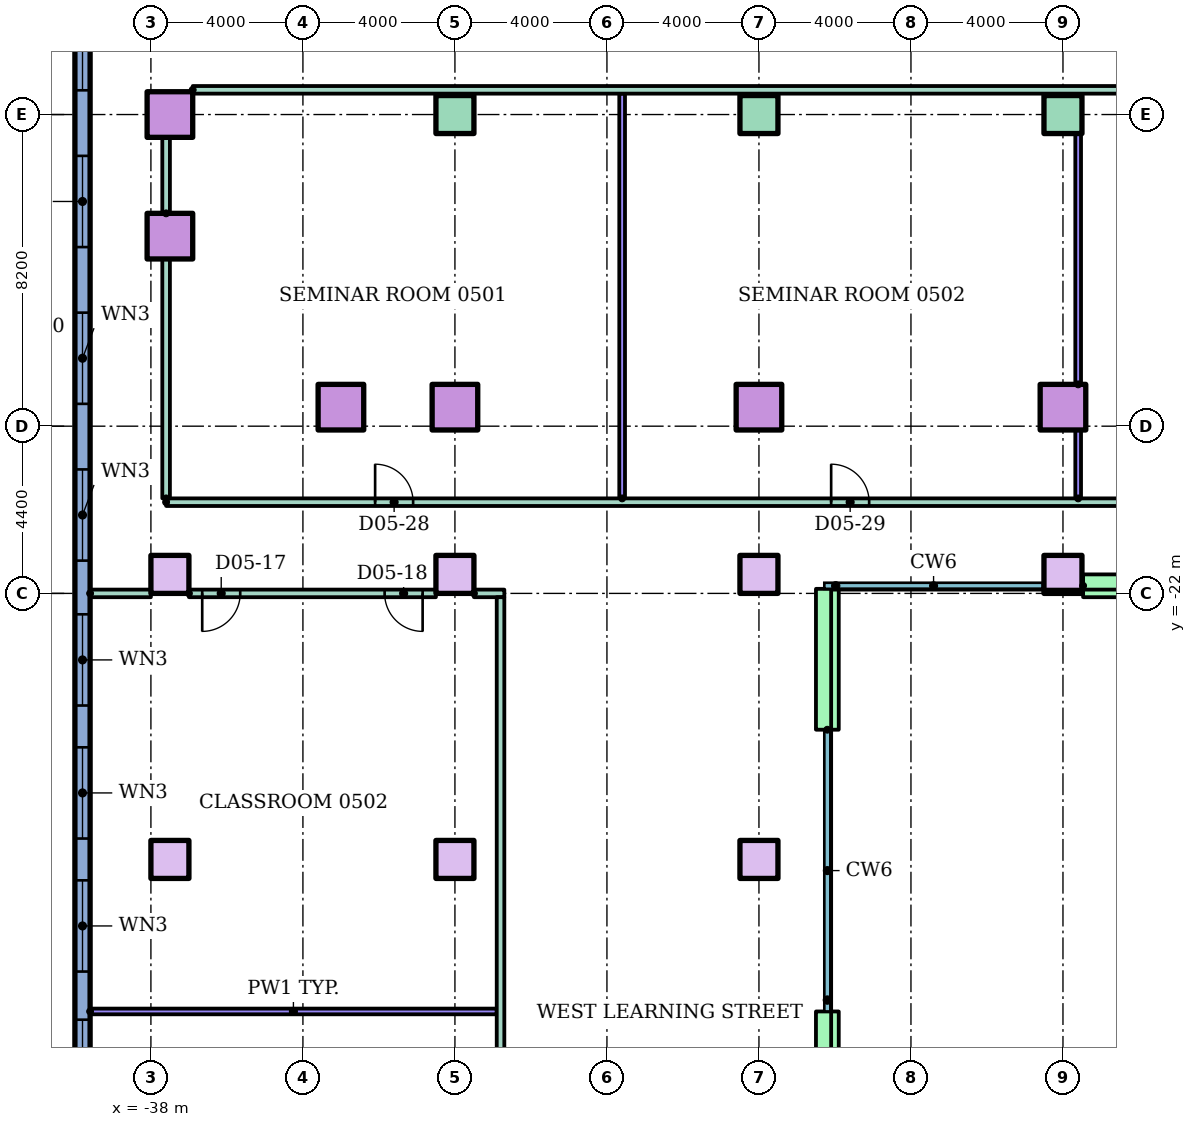
"""IFC4 building model, lengths in metres.
Left out: names, types, materials, properties, quantities, classifications, styles, units other than length and angle.
Written with IfcOpenShell. Run it as: python <this file> out.ifc"""

import sys

from ifc_helpers import new_model, si_unit, direction, frame, frame_2d, origin, origin_2d, place, context, subcontext, project, spatial, rectangle, hollow_rectangle, extrude, element, fill, save


model = new_model("IFC4")
c1 = context("Model", 3, precision=1e-05, world=origin(), true_north=direction((0.0, 1.0)))
c2 = subcontext(c1, "Body", "Model", "MODEL_VIEW")
j1 = project(units=[si_unit("LENGTHUNIT", "METRE"), si_unit("PLANEANGLEUNIT", "RADIAN")], contexts=[c1])
p1 = place(None, origin())
s1 = spatial("IfcSite", under=j1, at=p1, CompositionType="ELEMENT")
p2 = place(p1, origin())
s2 = spatial("IfcBuilding", under=s1, at=p2, CompositionType="ELEMENT")
p3 = place(p2, frame((0.0, 0.0, 22.0)))
s3 = spatial("IfcBuildingStorey", under=s2, at=p3, CompositionType="ELEMENT", Elevation=22.0)
for number, where in (
    (1, (-33.0, -17.1, 0.0)),
    (2, (-30.0, -17.1, 0.0)),
    (3, (-22.0, -17.1, 0.0)),
    (4, (-14.0, -17.1, 0.0)),
    (5, (-37.5, -12.6, 0.0)),
    (6, (-37.5, -9.4, 0.0)),
):
    element("IfcColumn", number, at=place(p3, frame(where)), inside=s3, PredefinedType="COLUMN", context=c2, shape_type="SweptSolid", body=[
        extrude(hollow_rectangle(XDim=1.2, YDim=1.2, WallThickness=0.06, at=origin_2d()), origin(), (0.0, 0.0, 1.0), 4.0),
    ])
for number, where in (
    (7, (-30.0, -9.4, 0.0)),
    (8, (-22.0, -9.4, 0.0)),
    (9, (-14.0, -9.4, 0.0)),
):
    element("IfcColumn", number, at=place(p3, frame(where)), inside=s3, PredefinedType="COLUMN", context=c2, shape_type="SweptSolid", body=[
        extrude(rectangle(XDim=1.0, YDim=1.0, at=origin_2d()), origin(), (0.0, 0.0, 1.0), 4.0),
    ])
for number, where in (
    (10, (-37.5, -29.0, 0.0)),
    (11, (-30.0, -29.0, 0.0)),
    (12, (-22.0, -29.0, 0.0)),
    (13, (-37.5, -21.5, 0.0)),
    (14, (-30.0, -21.5, 0.0)),
    (15, (-22.0, -21.5, 0.0)),
    (16, (-14.0, -21.5, 0.0)),
):
    element("IfcColumn", number, at=place(p3, frame(where)), inside=s3, PredefinedType="COLUMN", context=c2, shape_type="SweptSolid", body=[
        extrude(rectangle(XDim=1.0, YDim=1.0, at=origin_2d()), origin(), (0.0, 0.0, 1.0), 3.7),
    ])
p4 = place(p3, frame((-39.8, 20.0, 0.0), z_axis=(0.0, 0.0, 1.0), x_axis=(0.0, -1.0, 0.0)))
e17 = element("IfcWall", 17, at=p4, inside=s3, PredefinedType="STANDARD", context=c2, shape_type="SweptSolid", body=[
    extrude(rectangle(XDim=70.0, YDim=0.4, at=frame_2d((35.0, 0.0))), origin(), (0.0, 0.0, 1.0), 3.7),
])
p5 = place(p4, frame((1.05, 0.0, 0.9)))
e18 = element("IfcOpeningElement", 18, at=p5, cuts=e17, PredefinedType="OPENING", context=c2, shape_type="SweptSolid", body=[
    extrude(rectangle(XDim=2.4, YDim=2.1, at=frame_2d((1.2, 1.05))), frame((0.0, 0.21, 0.0), z_axis=(0.0, -1.0, 0.0), x_axis=(1.0, 0.0, 0.0)), (0.0, 0.0, 1.0), 0.42),
])
p6 = place(p4, frame((5.55, 0.0, 0.9)))
e19 = element("IfcOpeningElement", 19, at=p6, cuts=e17, PredefinedType="OPENING", context=c2, shape_type="SweptSolid", body=[
    extrude(rectangle(XDim=2.4, YDim=2.1, at=frame_2d((1.2, 1.05))), frame((0.0, 0.21, 0.0), z_axis=(0.0, -1.0, 0.0), x_axis=(1.0, 0.0, 0.0)), (0.0, 0.0, 1.0), 0.42),
])
p7 = place(p4, frame((9.863, 0.0, 0.9)))
e20 = element("IfcOpeningElement", 20, at=p7, cuts=e17, PredefinedType="OPENING", context=c2, shape_type="SweptSolid", body=[
    extrude(rectangle(XDim=2.4, YDim=2.1, at=frame_2d((1.2, 1.05))), frame((0.0, 0.21, 0.0), z_axis=(0.0, -1.0, 0.0), x_axis=(1.0, 0.0, 0.0)), (0.0, 0.0, 1.0), 0.42),
])
p8 = place(p4, frame((13.988, 0.0, 0.9)))
e21 = element("IfcOpeningElement", 21, at=p8, cuts=e17, PredefinedType="OPENING", context=c2, shape_type="SweptSolid", body=[
    extrude(rectangle(XDim=2.4, YDim=2.1, at=frame_2d((1.2, 1.05))), frame((0.0, 0.21, 0.0), z_axis=(0.0, -1.0, 0.0), x_axis=(1.0, 0.0, 0.0)), (0.0, 0.0, 1.0), 0.42),
])
p9 = place(p4, frame((18.113, 0.0, 0.9)))
e22 = element("IfcOpeningElement", 22, at=p9, cuts=e17, PredefinedType="OPENING", context=c2, shape_type="SweptSolid", body=[
    extrude(rectangle(XDim=2.4, YDim=2.1, at=frame_2d((1.2, 1.05))), frame((0.0, 0.21, 0.0), z_axis=(0.0, -1.0, 0.0), x_axis=(1.0, 0.0, 0.0)), (0.0, 0.0, 1.0), 0.42),
])
p10 = place(p4, frame((22.238, 0.0, 0.9)))
e23 = element("IfcOpeningElement", 23, at=p10, cuts=e17, PredefinedType="OPENING", context=c2, shape_type="SweptSolid", body=[
    extrude(rectangle(XDim=2.4, YDim=2.1, at=frame_2d((1.2, 1.05))), frame((0.0, 0.21, 0.0), z_axis=(0.0, -1.0, 0.0), x_axis=(1.0, 0.0, 0.0)), (0.0, 0.0, 1.0), 0.42),
])
p11 = place(p4, frame((26.363, 0.0, 0.9)))
e24 = element("IfcOpeningElement", 24, at=p11, cuts=e17, PredefinedType="OPENING", context=c2, shape_type="SweptSolid", body=[
    extrude(rectangle(XDim=2.4, YDim=2.1, at=frame_2d((1.2, 1.05))), frame((0.0, 0.21, 0.0), z_axis=(0.0, -1.0, 0.0), x_axis=(1.0, 0.0, 0.0)), (0.0, 0.0, 1.0), 0.42),
])
p12 = place(p4, frame((30.488, 0.0, 0.9)))
e25 = element("IfcOpeningElement", 25, at=p12, cuts=e17, PredefinedType="OPENING", context=c2, shape_type="SweptSolid", body=[
    extrude(rectangle(XDim=2.4, YDim=2.1, at=frame_2d((1.2, 1.05))), frame((0.0, 0.21, 0.0), z_axis=(0.0, -1.0, 0.0), x_axis=(1.0, 0.0, 0.0)), (0.0, 0.0, 1.0), 0.42),
])
p13 = place(p4, frame((34.613, 0.0, 0.9)))
e26 = element("IfcOpeningElement", 26, at=p13, cuts=e17, PredefinedType="OPENING", context=c2, shape_type="SweptSolid", body=[
    extrude(rectangle(XDim=2.4, YDim=2.1, at=frame_2d((1.2, 1.05))), frame((0.0, 0.21, 0.0), z_axis=(0.0, -1.0, 0.0), x_axis=(1.0, 0.0, 0.0)), (0.0, 0.0, 1.0), 0.42),
])
p14 = place(p4, frame((38.738, 0.0, 0.9)))
e27 = element("IfcOpeningElement", 27, at=p14, cuts=e17, PredefinedType="OPENING", context=c2, shape_type="SweptSolid", body=[
    extrude(rectangle(XDim=2.4, YDim=2.1, at=frame_2d((1.2, 1.05))), frame((0.0, 0.21, 0.0), z_axis=(0.0, -1.0, 0.0), x_axis=(1.0, 0.0, 0.0)), (0.0, 0.0, 1.0), 0.42),
])
p15 = place(p4, frame((42.55, 0.0, 0.9)))
e28 = element("IfcOpeningElement", 28, at=p15, cuts=e17, PredefinedType="OPENING", context=c2, shape_type="SweptSolid", body=[
    extrude(rectangle(XDim=2.4, YDim=2.1, at=frame_2d((1.2, 1.05))), frame((0.0, 0.21, 0.0), z_axis=(0.0, -1.0, 0.0), x_axis=(1.0, 0.0, 0.0)), (0.0, 0.0, 1.0), 0.42),
])
p16 = place(p4, frame((46.05, 0.0, 0.9)))
e29 = element("IfcOpeningElement", 29, at=p16, cuts=e17, PredefinedType="OPENING", context=c2, shape_type="SweptSolid", body=[
    extrude(rectangle(XDim=2.4, YDim=2.1, at=frame_2d((1.2, 1.05))), frame((0.0, 0.21, 0.0), z_axis=(0.0, -1.0, 0.0), x_axis=(1.0, 0.0, 0.0)), (0.0, 0.0, 1.0), 0.42),
])
p17 = place(p4, frame((49.55, 0.0, 0.9)))
e30 = element("IfcOpeningElement", 30, at=p17, cuts=e17, PredefinedType="OPENING", context=c2, shape_type="SweptSolid", body=[
    extrude(rectangle(XDim=2.4, YDim=2.1, at=frame_2d((1.2, 1.05))), frame((0.0, 0.21, 0.0), z_axis=(0.0, -1.0, 0.0), x_axis=(1.0, 0.0, 0.0)), (0.0, 0.0, 1.0), 0.42),
])
p18 = place(p4, frame((53.217, 0.0, 0.9)))
e31 = element("IfcOpeningElement", 31, at=p18, cuts=e17, PredefinedType="OPENING", context=c2, shape_type="SweptSolid", body=[
    extrude(rectangle(XDim=2.4, YDim=2.1, at=frame_2d((1.2, 1.05))), frame((0.0, 0.21, 0.0), z_axis=(0.0, -1.0, 0.0), x_axis=(1.0, 0.0, 0.0)), (0.0, 0.0, 1.0), 0.42),
])
p19 = place(p4, frame((57.05, 0.0, 0.9)))
e32 = element("IfcOpeningElement", 32, at=p19, cuts=e17, PredefinedType="OPENING", context=c2, shape_type="SweptSolid", body=[
    extrude(rectangle(XDim=2.4, YDim=2.1, at=frame_2d((1.2, 1.05))), frame((0.0, 0.21, 0.0), z_axis=(0.0, -1.0, 0.0), x_axis=(1.0, 0.0, 0.0)), (0.0, 0.0, 1.0), 0.42),
])
p20 = place(p4, frame((60.883, 0.0, 0.9)))
e33 = element("IfcOpeningElement", 33, at=p20, cuts=e17, PredefinedType="OPENING", context=c2, shape_type="SweptSolid", body=[
    extrude(rectangle(XDim=2.4, YDim=2.1, at=frame_2d((1.2, 1.05))), frame((0.0, 0.21, 0.0), z_axis=(0.0, -1.0, 0.0), x_axis=(1.0, 0.0, 0.0)), (0.0, 0.0, 1.0), 0.42),
])
p21 = place(p4, frame((66.85, 0.0, 0.9)))
e34 = element("IfcOpeningElement", 34, at=p21, cuts=e17, PredefinedType="OPENING", context=c2, shape_type="SweptSolid", body=[
    extrude(rectangle(XDim=2.4, YDim=2.1, at=frame_2d((1.2, 1.05))), frame((0.0, 0.21, 0.0), z_axis=(0.0, -1.0, 0.0), x_axis=(1.0, 0.0, 0.0)), (0.0, 0.0, 1.0), 0.42),
])
for number, where, z_axis, x_axis in (
    (35, (-20.2, -36.707, 0.0), (0.0, 0.0, 1.0), (0.0, 1.0, 0.0)),
    (36, (-20.2, -25.587, 0.0), (0.0, 0.0, 1.0), (0.0, 1.0, 0.0)),
):
    element("IfcWall", number, at=place(p3, frame(where, z_axis=z_axis, x_axis=x_axis)), inside=s3, PredefinedType="STANDARD", context=c2, shape_type="SweptSolid", body=[
        extrude(rectangle(XDim=3.707, YDim=0.6, at=frame_2d((1.854, 0.0))), origin(), (0.0, 0.0, 1.0), 3.7),
    ])
p22 = place(p3, frame((-13.47, -21.8, 0.0)))
e37 = element("IfcWall", 37, at=p22, inside=s3, PredefinedType="STANDARD", context=c2, shape_type="SweptSolid", body=[
    extrude(rectangle(XDim=1.47, YDim=0.6, at=frame_2d((0.735, 0.0))), origin(), (0.0, 0.0, 1.0), 3.7),
])
p23 = place(p3, frame((-39.6, -33.0, 0.0)))
e38 = element("IfcWall", 38, at=p23, inside=s3, PredefinedType="PARTITIONING", context=c2, shape_type="SweptSolid", body=[
    extrude(rectangle(XDim=10.7, YDim=0.15, at=frame_2d((5.35, 0.0))), origin(), (0.0, 0.0, 1.0), 3.2),
])
p24 = place(p3, frame((-39.6, -22.0, 0.0)))
e39 = element("IfcWall", 39, at=p24, inside=s3, PredefinedType="PARTITIONING", context=c2, shape_type="SweptSolid", body=[
    extrude(rectangle(XDim=1.6, YDim=0.2, at=frame_2d((0.8, 0.0))), origin(), (0.0, 0.0, 1.0), 3.2),
])
p25 = place(p3, frame((-37.0, -22.0, 0.0)))
e40 = element("IfcWall", 40, at=p25, inside=s3, PredefinedType="PARTITIONING", context=c2, shape_type="SweptSolid", body=[
    extrude(rectangle(XDim=6.5, YDim=0.2, at=frame_2d((3.25, 0.0))), origin(), (0.0, 0.0, 1.0), 3.2),
])
p26 = place(p25, frame((0.35, 0.0, 0.0)))
e41 = element("IfcOpeningElement", 41, at=p26, cuts=e40, PredefinedType="OPENING", context=c2, shape_type="SweptSolid", body=[
    extrude(rectangle(XDim=1.0, YDim=2.1, at=frame_2d((0.5, 1.05))), frame((0.0, 0.11, 0.0), z_axis=(0.0, -1.0, 0.0), x_axis=(1.0, 0.0, 0.0)), (0.0, 0.0, 1.0), 0.22),
])
p27 = place(p25, frame((5.15, 0.0, 0.0)))
e42 = element("IfcOpeningElement", 42, at=p27, cuts=e40, PredefinedType="OPENING", context=c2, shape_type="SweptSolid", body=[
    extrude(rectangle(XDim=1.0, YDim=2.1, at=frame_2d((0.5, 1.05))), frame((0.0, 0.11, 0.0), z_axis=(0.0, -1.0, 0.0), x_axis=(1.0, 0.0, 0.0)), (0.0, 0.0, 1.0), 0.22),
])
p28 = place(p3, frame((-29.5, -22.0, 0.0)))
e43 = element("IfcWall", 43, at=p28, inside=s3, PredefinedType="PARTITIONING", context=c2, shape_type="SweptSolid", body=[
    extrude(rectangle(XDim=0.8, YDim=0.2, at=frame_2d((0.4, 0.0))), origin(), (0.0, 0.0, 1.0), 3.2),
])
p29 = place(p3, frame((-37.6, -19.6, 0.0)))
e44 = element("IfcWall", 44, at=p29, inside=s3, PredefinedType="PARTITIONING", context=c2, shape_type="SweptSolid", body=[
    extrude(rectangle(XDim=75.2, YDim=0.2, at=frame_2d((37.6, 0.0))), origin(), (0.0, 0.0, 1.0), 3.2),
])
p30 = place(p29, frame((5.5, 0.0, 0.0)))
e45 = element("IfcOpeningElement", 45, at=p30, cuts=e44, PredefinedType="OPENING", context=c2, shape_type="SweptSolid", body=[
    extrude(rectangle(XDim=1.0, YDim=2.1, at=frame_2d((0.5, 1.05))), frame((0.0, 0.11, 0.0), z_axis=(0.0, -1.0, 0.0), x_axis=(1.0, 0.0, 0.0)), (0.0, 0.0, 1.0), 0.22),
])
p31 = place(p29, frame((17.5, 0.0, 0.0)))
e46 = element("IfcOpeningElement", 46, at=p31, cuts=e44, PredefinedType="OPENING", context=c2, shape_type="SweptSolid", body=[
    extrude(rectangle(XDim=1.0, YDim=2.1, at=frame_2d((0.5, 1.05))), frame((0.0, 0.11, 0.0), z_axis=(0.0, -1.0, 0.0), x_axis=(1.0, 0.0, 0.0)), (0.0, 0.0, 1.0), 0.22),
])
p32 = place(p29, frame((29.5, 0.0, 0.0)))
e47 = element("IfcOpeningElement", 47, at=p32, cuts=e44, PredefinedType="OPENING", context=c2, shape_type="SweptSolid", body=[
    extrude(rectangle(XDim=1.0, YDim=2.1, at=frame_2d((0.5, 1.05))), frame((0.0, 0.11, 0.0), z_axis=(0.0, -1.0, 0.0), x_axis=(1.0, 0.0, 0.0)), (0.0, 0.0, 1.0), 0.22),
])
p33 = place(p29, frame((40.5, 0.0, 0.0)))
e48 = element("IfcOpeningElement", 48, at=p33, cuts=e44, PredefinedType="OPENING", context=c2, shape_type="SweptSolid", body=[
    extrude(rectangle(XDim=1.0, YDim=2.1, at=frame_2d((0.5, 1.05))), frame((0.0, 0.11, 0.0), z_axis=(0.0, -1.0, 0.0), x_axis=(1.0, 0.0, 0.0)), (0.0, 0.0, 1.0), 0.22),
])
p34 = place(p29, frame((51.5, 0.0, 0.0)))
e49 = element("IfcOpeningElement", 49, at=p34, cuts=e44, PredefinedType="OPENING", context=c2, shape_type="SweptSolid", body=[
    extrude(rectangle(XDim=1.0, YDim=2.1, at=frame_2d((0.5, 1.05))), frame((0.0, 0.11, 0.0), z_axis=(0.0, -1.0, 0.0), x_axis=(1.0, 0.0, 0.0)), (0.0, 0.0, 1.0), 0.22),
])
p35 = place(p29, frame((66.1, 0.0, 0.0)))
e50 = element("IfcOpeningElement", 50, at=p35, cuts=e44, PredefinedType="OPENING", context=c2, shape_type="SweptSolid", body=[
    extrude(rectangle(XDim=1.0, YDim=2.1, at=frame_2d((0.5, 1.05))), frame((0.0, 0.11, 0.0), z_axis=(0.0, -1.0, 0.0), x_axis=(1.0, 0.0, 0.0)), (0.0, 0.0, 1.0), 0.22),
])
p36 = place(p3, frame((-36.9, -8.75, 0.0)))
e51 = element("IfcWall", 51, at=p36, inside=s3, PredefinedType="PARTITIONING", context=c2, shape_type="SweptSolid", body=[
    extrude(rectangle(XDim=73.8, YDim=0.2, at=frame_2d((36.9, 0.0))), origin(), (0.0, 0.0, 1.0), 3.2),
])
p37 = place(p3, frame((-37.6, -19.5, 0.0), z_axis=(0.0, 0.0, 1.0), x_axis=(0.0, 1.0, 0.0)))
e52 = element("IfcWall", 52, at=p37, inside=s3, PredefinedType="PARTITIONING", context=c2, shape_type="SweptSolid", body=[
    extrude(rectangle(XDim=6.3, YDim=0.2, at=frame_2d((3.15, 0.0))), origin(), (0.0, 0.0, 1.0), 3.2),
])
p38 = place(p3, frame((-37.6, -12.0, 0.0), z_axis=(0.0, 0.0, 1.0), x_axis=(0.0, 1.0, 0.0)))
e53 = element("IfcWall", 53, at=p38, inside=s3, PredefinedType="PARTITIONING", context=c2, shape_type="SweptSolid", body=[
    extrude(rectangle(XDim=2.0, YDim=0.2, at=frame_2d((1.0, 0.0))), origin(), (0.0, 0.0, 1.0), 3.2),
])
p39 = place(p3, frame((-28.8, -44.0, 0.0), z_axis=(0.0, 0.0, 1.0), x_axis=(0.0, 1.0, 0.0)))
e54 = element("IfcWall", 54, at=p39, inside=s3, PredefinedType="PARTITIONING", context=c2, shape_type="SweptSolid", body=[
    extrude(rectangle(XDim=21.9, YDim=0.2, at=frame_2d((10.95, 0.0))), origin(), (0.0, 0.0, 1.0), 3.2),
])
p40 = place(p3, frame((-25.6, -19.5, 0.0), z_axis=(0.0, 0.0, 1.0), x_axis=(0.0, 1.0, 0.0)))
e55 = element("IfcWall", 55, at=p40, inside=s3, PredefinedType="PARTITIONING", context=c2, shape_type="SweptSolid", body=[
    extrude(rectangle(XDim=10.65, YDim=0.15, at=frame_2d((5.325, 0.0))), origin(), (0.0, 0.0, 1.0), 3.2),
])
p41 = place(p3, frame((-13.6, -19.5, 0.0), z_axis=(0.0, 0.0, 1.0), x_axis=(0.0, 1.0, 0.0)))
e56 = element("IfcWall", 56, at=p41, inside=s3, PredefinedType="PARTITIONING", context=c2, shape_type="SweptSolid", body=[
    extrude(rectangle(XDim=1.8, YDim=0.15, at=frame_2d((0.9, 0.0))), origin(), (0.0, 0.0, 1.0), 3.2),
])
p42 = place(p3, frame((-13.6, -16.5, 0.0), z_axis=(0.0, 0.0, 1.0), x_axis=(0.0, 1.0, 0.0)))
e57 = element("IfcWall", 57, at=p42, inside=s3, PredefinedType="PARTITIONING", context=c2, shape_type="SweptSolid", body=[
    extrude(rectangle(XDim=6.6, YDim=0.15, at=frame_2d((3.3, 0.0))), origin(), (0.0, 0.0, 1.0), 3.2),
])
p43 = place(p11, origin())
e58 = element("IfcWindow", 58, at=p43, inside=s3, PartitioningType="SINGLE_PANEL", PredefinedType="WINDOW", context=c2, shape_type="SweptSolid", body=[
    extrude(rectangle(XDim=2.4, YDim=2.1, at=frame_2d((1.2, 1.05))), frame((0.0, 0.03, 0.0), z_axis=(0.0, -1.0, 0.0), x_axis=(1.0, 0.0, 0.0)), (0.0, 0.0, 1.0), 0.06),
])
fill(e24, e58)
p44 = place(p12, origin())
e59 = element("IfcWindow", 59, at=p44, inside=s3, PartitioningType="SINGLE_PANEL", PredefinedType="WINDOW", context=c2, shape_type="SweptSolid", body=[
    extrude(rectangle(XDim=2.4, YDim=2.1, at=frame_2d((1.2, 1.05))), frame((0.0, 0.03, 0.0), z_axis=(0.0, -1.0, 0.0), x_axis=(1.0, 0.0, 0.0)), (0.0, 0.0, 1.0), 0.06),
])
fill(e25, e59)
p45 = place(p13, origin())
e60 = element("IfcWindow", 60, at=p45, inside=s3, PartitioningType="SINGLE_PANEL", PredefinedType="WINDOW", context=c2, shape_type="SweptSolid", body=[
    extrude(rectangle(XDim=2.4, YDim=2.1, at=frame_2d((1.2, 1.05))), frame((0.0, 0.03, 0.0), z_axis=(0.0, -1.0, 0.0), x_axis=(1.0, 0.0, 0.0)), (0.0, 0.0, 1.0), 0.06),
])
fill(e26, e60)
p46 = place(p14, origin())
e61 = element("IfcWindow", 61, at=p46, inside=s3, PartitioningType="SINGLE_PANEL", PredefinedType="WINDOW", context=c2, shape_type="SweptSolid", body=[
    extrude(rectangle(XDim=2.4, YDim=2.1, at=frame_2d((1.2, 1.05))), frame((0.0, 0.03, 0.0), z_axis=(0.0, -1.0, 0.0), x_axis=(1.0, 0.0, 0.0)), (0.0, 0.0, 1.0), 0.06),
])
fill(e27, e61)
p47 = place(p15, origin())
e62 = element("IfcWindow", 62, at=p47, inside=s3, PartitioningType="SINGLE_PANEL", PredefinedType="WINDOW", context=c2, shape_type="SweptSolid", body=[
    extrude(rectangle(XDim=2.4, YDim=2.1, at=frame_2d((1.2, 1.05))), frame((0.0, 0.03, 0.0), z_axis=(0.0, -1.0, 0.0), x_axis=(1.0, 0.0, 0.0)), (0.0, 0.0, 1.0), 0.06),
])
fill(e28, e62)
p48 = place(p16, origin())
e63 = element("IfcWindow", 63, at=p48, inside=s3, PartitioningType="SINGLE_PANEL", PredefinedType="WINDOW", context=c2, shape_type="SweptSolid", body=[
    extrude(rectangle(XDim=2.4, YDim=2.1, at=frame_2d((1.2, 1.05))), frame((0.0, 0.03, 0.0), z_axis=(0.0, -1.0, 0.0), x_axis=(1.0, 0.0, 0.0)), (0.0, 0.0, 1.0), 0.06),
])
fill(e29, e63)
p49 = place(p17, origin())
e64 = element("IfcWindow", 64, at=p49, inside=s3, PartitioningType="SINGLE_PANEL", PredefinedType="WINDOW", context=c2, shape_type="SweptSolid", body=[
    extrude(rectangle(XDim=2.4, YDim=2.1, at=frame_2d((1.2, 1.05))), frame((0.0, 0.03, 0.0), z_axis=(0.0, -1.0, 0.0), x_axis=(1.0, 0.0, 0.0)), (0.0, 0.0, 1.0), 0.06),
])
fill(e30, e64)
p50 = place(p18, origin())
e65 = element("IfcWindow", 65, at=p50, inside=s3, PartitioningType="SINGLE_PANEL", PredefinedType="WINDOW", context=c2, shape_type="SweptSolid", body=[
    extrude(rectangle(XDim=2.4, YDim=2.1, at=frame_2d((1.2, 1.05))), frame((0.0, 0.03, 0.0), z_axis=(0.0, -1.0, 0.0), x_axis=(1.0, 0.0, 0.0)), (0.0, 0.0, 1.0), 0.06),
])
fill(e31, e65)
p51 = place(p26, frame((1.0, 0.0, 0.0), z_axis=(0.0, 0.0, 1.0), x_axis=(-1.0, 0.0, 0.0)))
e66 = element("IfcDoor", 66, at=p51, inside=s3, OperationType="SINGLE_SWING_LEFT", PredefinedType="DOOR", context=c2, shape_type="SweptSolid", body=[
    extrude(rectangle(XDim=1.0, YDim=2.1, at=frame_2d((0.5, 1.05))), frame((0.0, 0.025, 0.0), z_axis=(0.0, -1.0, 0.0), x_axis=(1.0, 0.0, 0.0)), (0.0, 0.0, 1.0), 0.05),
])
fill(e41, e66)
p52 = place(p27, frame((1.0, 0.0, 0.0), z_axis=(0.0, 0.0, 1.0), x_axis=(-1.0, 0.0, 0.0)))
e67 = element("IfcDoor", 67, at=p52, inside=s3, OperationType="SINGLE_SWING_RIGHT", PredefinedType="DOOR", context=c2, shape_type="SweptSolid", body=[
    extrude(rectangle(XDim=1.0, YDim=2.1, at=frame_2d((0.5, 1.05))), frame((0.0, 0.025, 0.0), z_axis=(0.0, -1.0, 0.0), x_axis=(1.0, 0.0, 0.0)), (0.0, 0.0, 1.0), 0.05),
])
fill(e42, e67)
p53 = place(p30, origin())
e68 = element("IfcDoor", 68, at=p53, inside=s3, OperationType="SINGLE_SWING_LEFT", PredefinedType="DOOR", context=c2, shape_type="SweptSolid", body=[
    extrude(rectangle(XDim=1.0, YDim=2.1, at=frame_2d((0.5, 1.05))), frame((0.0, 0.025, 0.0), z_axis=(0.0, -1.0, 0.0), x_axis=(1.0, 0.0, 0.0)), (0.0, 0.0, 1.0), 0.05),
])
fill(e45, e68)
p54 = place(p31, origin())
e69 = element("IfcDoor", 69, at=p54, inside=s3, OperationType="SINGLE_SWING_LEFT", PredefinedType="DOOR", context=c2, shape_type="SweptSolid", body=[
    extrude(rectangle(XDim=1.0, YDim=2.1, at=frame_2d((0.5, 1.05))), frame((0.0, 0.025, 0.0), z_axis=(0.0, -1.0, 0.0), x_axis=(1.0, 0.0, 0.0)), (0.0, 0.0, 1.0), 0.05),
])
fill(e46, e69)
save(model, sys.argv[1])
